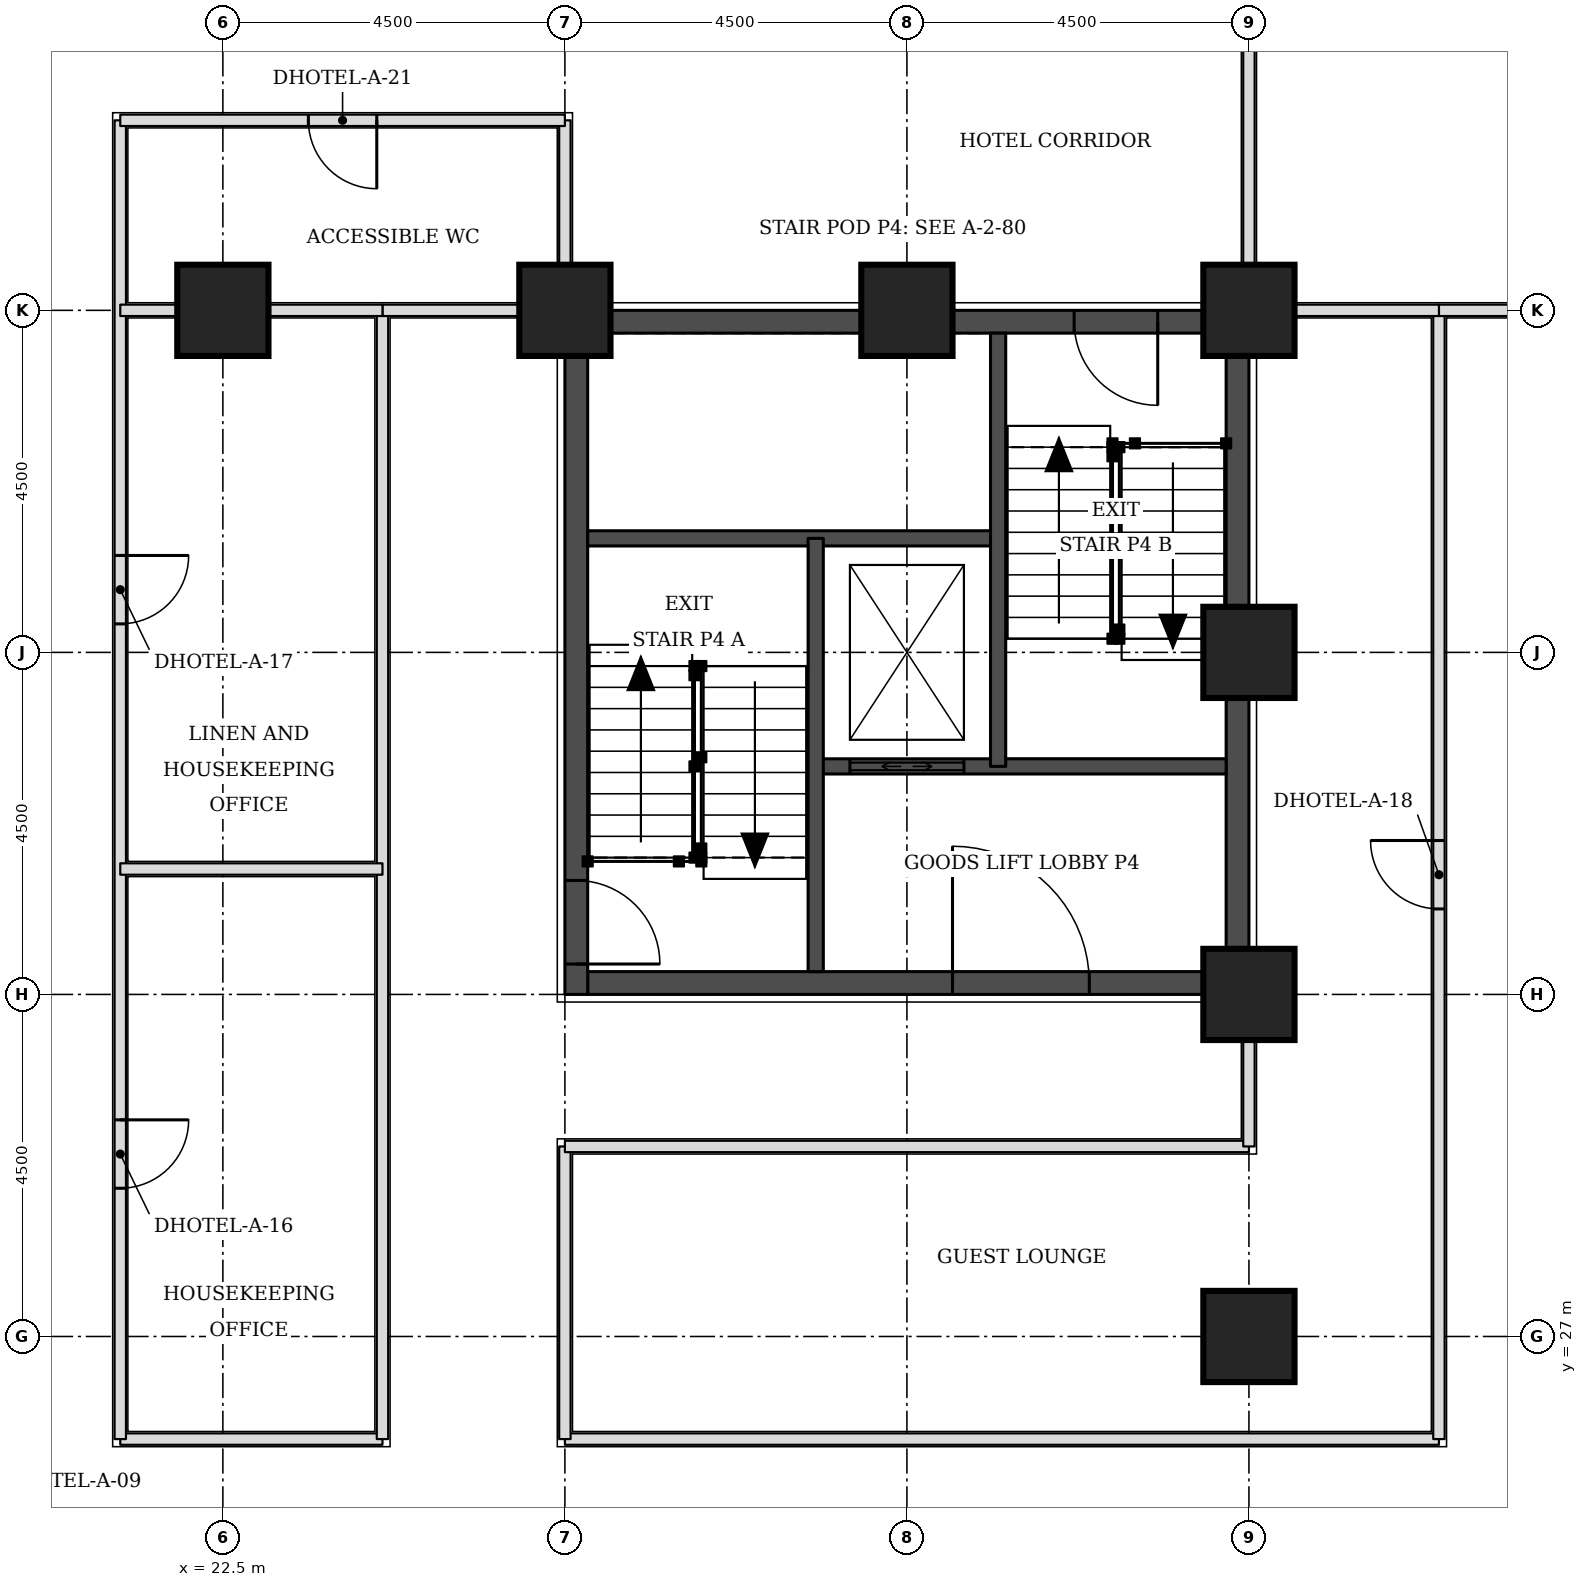
"""IFC4 building model, lengths in metres.
Left out: names, types, materials, properties, quantities, classifications, styles, units other than length and angle.
Written with IfcOpenShell. Run it as: python <this file> out.ifc"""

import sys

from ifc_helpers import new_model, si_unit, direction, frame, frame_2d, origin, origin_2d, place, context, subcontext, project, spatial, rectangle, extrude, element, fill, save


model = new_model("IFC4")
c1 = context("Model", 3, precision=1e-05, world=origin(), true_north=direction((0.0, 1.0)))
c2 = subcontext(c1, "Body", "Model", "MODEL_VIEW")
j1 = project(units=[si_unit("LENGTHUNIT", "METRE"), si_unit("PLANEANGLEUNIT", "RADIAN")], contexts=[c1])
p1 = place(None, origin())
s1 = spatial("IfcSite", under=j1, at=p1, CompositionType="ELEMENT")
p2 = place(p1, origin())
s2 = spatial("IfcBuilding", under=s1, at=p2, CompositionType="ELEMENT")
p3 = place(p2, frame((0.0, 0.0, 49.5)))
s3 = spatial("IfcBuildingStorey", under=s2, at=p3, CompositionType="ELEMENT", Elevation=49.5)
for number, where, z_axis, x_axis in (
    (1, (36.0, 27.0, 0.0), (0.0, 0.0, 1.0), (1.0, 0.0, 0.0)),
    (2, (36.0, 31.5, 0.0), (0.0, 0.0, 1.0), (1.0, 0.0, 0.0)),
    (3, (36.0, 36.0, 0.0), (0.0, 0.0, 1.0), (1.0, 0.0, 0.0)),
    (4, (22.5, 40.5, 0.0), (0.0, 0.0, 1.0), (1.0, 0.0, 0.0)),
    (5, (27.0, 40.5, 0.0), (0.0, 0.0, 1.0), (1.0, 0.0, 0.0)),
    (6, (31.5, 40.5, 0.0), (0.0, 0.0, 1.0), (1.0, 0.0, 0.0)),
    (7, (36.0, 40.5, 0.0), (0.0, 0.0, 1.0), (1.0, 0.0, 0.0)),
):
    element("IfcColumn", number, at=place(p3, frame(where, z_axis=z_axis, x_axis=x_axis)), inside=s3, PredefinedType="COLUMN", context=c2, shape_type="SweptSolid", body=[
        extrude(rectangle(XDim=1.2, YDim=1.2, at=origin_2d()), origin(), (0.0, 0.0, 1.0), 3.3),
    ])
p4 = place(p3, frame((27.3, 31.65, 0.0), z_axis=(0.0, 0.0, 1.0), x_axis=(1.0, 0.0, 0.0)))
e8 = element("IfcWall", 8, at=p4, inside=s3, PredefinedType="SHEAR", context=c2, shape_type="SweptSolid", body=[
    extrude(rectangle(XDim=8.4, YDim=0.3, at=frame_2d((4.2, 0.0))), origin(), (0.0, 0.0, 1.0), 3.3),
])
p5 = place(p4, frame((4.8, 0.0, 0.0)))
e9 = element("IfcOpeningElement", 9, at=p5, cuts=e8, PredefinedType="OPENING", context=c2, shape_type="SweptSolid", body=[
    extrude(rectangle(XDim=1.8, YDim=2.1, at=frame_2d((0.9, 1.05))), frame((0.0, 0.16, 0.0), z_axis=(0.0, -1.0, 0.0), x_axis=(1.0, 0.0, 0.0)), (0.0, 0.0, 1.0), 0.32),
])
p6 = place(p3, frame((27.3, 40.35, 0.0), z_axis=(0.0, 0.0, 1.0), x_axis=(1.0, 0.0, 0.0)))
e10 = element("IfcWall", 10, at=p6, inside=s3, PredefinedType="SHEAR", context=c2, shape_type="SweptSolid", body=[
    extrude(rectangle(XDim=8.4, YDim=0.3, at=frame_2d((4.2, 0.0))), origin(), (0.0, 0.0, 1.0), 3.3),
])
p7 = place(p6, frame((6.4, 0.0, 0.0)))
e11 = element("IfcOpeningElement", 11, at=p7, cuts=e10, PredefinedType="OPENING", context=c2, shape_type="SweptSolid", body=[
    extrude(rectangle(XDim=1.1, YDim=2.1, at=frame_2d((0.55, 1.05))), frame((0.0, 0.16, 0.0), z_axis=(0.0, -1.0, 0.0), x_axis=(1.0, 0.0, 0.0)), (0.0, 0.0, 1.0), 0.32),
])
p8 = place(p3, frame((27.15, 31.5, 0.0), z_axis=(0.0, 0.0, 1.0), x_axis=(0.0, 1.0, 0.0)))
e12 = element("IfcWall", 12, at=p8, inside=s3, PredefinedType="SHEAR", context=c2, shape_type="SweptSolid", body=[
    extrude(rectangle(XDim=9.0, YDim=0.3, at=frame_2d((4.5, 0.0))), origin(), (0.0, 0.0, 1.0), 3.3),
])
p9 = place(p8, frame((0.4, 0.0, 0.0)))
e13 = element("IfcOpeningElement", 13, at=p9, cuts=e12, PredefinedType="OPENING", context=c2, shape_type="SweptSolid", body=[
    extrude(rectangle(XDim=1.1, YDim=2.1, at=frame_2d((0.55, 1.05))), frame((0.0, 0.16, 0.0), z_axis=(0.0, -1.0, 0.0), x_axis=(1.0, 0.0, 0.0)), (0.0, 0.0, 1.0), 0.32),
])
p10 = place(p3, frame((35.85, 31.5, 0.0), z_axis=(0.0, 0.0, 1.0), x_axis=(0.0, 1.0, 0.0)))
e14 = element("IfcWall", 14, at=p10, inside=s3, PredefinedType="SHEAR", context=c2, shape_type="SweptSolid", body=[
    extrude(rectangle(XDim=9.0, YDim=0.3, at=frame_2d((4.5, 0.0))), origin(), (0.0, 0.0, 1.0), 3.3),
])
p11 = place(p3, frame((21.15, 25.65, 0.0), z_axis=(0.0, 0.0, 1.0), x_axis=(1.0, 0.0, 0.0)))
e15 = element("IfcWall", 15, at=p11, inside=s3, PredefinedType="PARTITIONING", context=c2, shape_type="SweptSolid", body=[
    extrude(rectangle(XDim=3.45, YDim=0.15, at=frame_2d((1.725, 0.0))), origin(), (0.0, 0.0, 1.0), 3.08),
])
p12 = place(p3, frame((21.15, 25.65, 0.0), z_axis=(0.0, 0.0, 1.0), x_axis=(0.0, 1.0, 0.0)))
e16 = element("IfcWall", 16, at=p12, inside=s3, PredefinedType="PARTITIONING", context=c2, shape_type="SweptSolid", body=[
    extrude(rectangle(XDim=17.35, YDim=0.15, at=frame_2d((8.675, 0.0))), origin(), (0.0, 0.0, 1.0), 3.08),
])
p13 = place(p12, frame((3.3, 0.0, 0.0)))
e17 = element("IfcOpeningElement", 17, at=p13, cuts=e16, PredefinedType="OPENING", context=c2, shape_type="SweptSolid", body=[
    extrude(rectangle(XDim=0.9, YDim=2.1, at=frame_2d((0.45, 1.05))), frame((0.0, 0.085, 0.0), z_axis=(0.0, -1.0, 0.0), x_axis=(1.0, 0.0, 0.0)), (0.0, 0.0, 1.0), 0.17),
])
p14 = place(p12, frame((10.725, 0.0, 0.0)))
e18 = element("IfcOpeningElement", 18, at=p14, cuts=e16, PredefinedType="OPENING", context=c2, shape_type="SweptSolid", body=[
    extrude(rectangle(XDim=0.9, YDim=2.1, at=frame_2d((0.45, 1.05))), frame((0.0, 0.085, 0.0), z_axis=(0.0, -1.0, 0.0), x_axis=(1.0, 0.0, 0.0)), (0.0, 0.0, 1.0), 0.17),
])
p15 = place(p3, frame((24.6, 25.65, 0.0), z_axis=(0.0, 0.0, 1.0), x_axis=(0.0, 1.0, 0.0)))
e19 = element("IfcWall", 19, at=p15, inside=s3, PredefinedType="PARTITIONING", context=c2, shape_type="SweptSolid", body=[
    extrude(rectangle(XDim=14.85, YDim=0.15, at=frame_2d((7.425, 0.0))), origin(), (0.0, 0.0, 1.0), 3.08),
])
p16 = place(p3, frame((27.0, 25.65, 0.0), z_axis=(0.0, 0.0, 1.0), x_axis=(1.0, 0.0, 0.0)))
e20 = element("IfcWall", 20, at=p16, inside=s3, PredefinedType="PARTITIONING", context=c2, shape_type="SweptSolid", body=[
    extrude(rectangle(XDim=11.5, YDim=0.15, at=frame_2d((5.75, 0.0))), origin(), (0.0, 0.0, 1.0), 3.08),
])
p17 = place(p3, frame((27.0, 25.65, 0.0), z_axis=(0.0, 0.0, 1.0), x_axis=(0.0, 1.0, 0.0)))
e21 = element("IfcWall", 21, at=p17, inside=s3, PredefinedType="PARTITIONING", context=c2, shape_type="SweptSolid", body=[
    extrude(rectangle(XDim=3.85, YDim=0.15, at=frame_2d((1.925, 0.0))), origin(), (0.0, 0.0, 1.0), 3.08),
])
p18 = place(p3, frame((38.5, 25.65, 0.0), z_axis=(0.0, 0.0, 1.0), x_axis=(0.0, 1.0, 0.0)))
e22 = element("IfcWall", 22, at=p18, inside=s3, PredefinedType="PARTITIONING", context=c2, shape_type="SweptSolid", body=[
    extrude(rectangle(XDim=14.85, YDim=0.15, at=frame_2d((7.425, 0.0))), origin(), (0.0, 0.0, 1.0), 3.08),
])
p19 = place(p18, frame((6.975, 0.0, 0.0)))
e23 = element("IfcOpeningElement", 23, at=p19, cuts=e22, PredefinedType="OPENING", context=c2, shape_type="SweptSolid", body=[
    extrude(rectangle(XDim=0.9, YDim=2.1, at=frame_2d((0.45, 1.05))), frame((0.0, 0.085, 0.0), z_axis=(0.0, -1.0, 0.0), x_axis=(1.0, 0.0, 0.0)), (0.0, 0.0, 1.0), 0.17),
])
p20 = place(p3, frame((27.0, 29.5, 0.0), z_axis=(0.0, 0.0, 1.0), x_axis=(1.0, 0.0, 0.0)))
e24 = element("IfcWall", 24, at=p20, inside=s3, PredefinedType="PARTITIONING", context=c2, shape_type="SweptSolid", body=[
    extrude(rectangle(XDim=9.0, YDim=0.15, at=frame_2d((4.5, 0.0))), origin(), (0.0, 0.0, 1.0), 3.08),
])
p21 = place(p3, frame((36.0, 29.5, 0.0), z_axis=(0.0, 0.0, 1.0), x_axis=(0.0, 1.0, 0.0)))
e25 = element("IfcWall", 25, at=p21, inside=s3, PredefinedType="PARTITIONING", context=c2, shape_type="SweptSolid", body=[
    extrude(rectangle(XDim=1.95, YDim=0.15, at=frame_2d((0.975, 0.0))), origin(), (0.0, 0.0, 1.0), 2.33),
])
p22 = place(p3, frame((24.6, 40.5, 0.0), z_axis=(0.0, 0.0, 1.0), x_axis=(1.0, 0.0, 0.0)))
e26 = element("IfcWall", 26, at=p22, inside=s3, PredefinedType="PARTITIONING", context=c2, shape_type="SweptSolid", body=[
    extrude(rectangle(XDim=2.35, YDim=0.15, at=frame_2d((1.175, 0.0))), origin(), (0.0, 0.0, 1.0), 2.33),
])
p23 = place(p3, frame((38.5, 40.5, 0.0), z_axis=(0.0, 0.0, 1.0), x_axis=(1.0, 0.0, 0.0)))
e27 = element("IfcWall", 27, at=p23, inside=s3, PredefinedType="PARTITIONING", context=c2, shape_type="SweptSolid", body=[
    extrude(rectangle(XDim=1.95, YDim=0.15, at=frame_2d((0.975, 0.0))), origin(), (0.0, 0.0, 1.0), 2.33),
])
p24 = place(p3, frame((27.0, 40.55, 0.0), z_axis=(0.0, 0.0, 1.0), x_axis=(0.0, 1.0, 0.0)))
e28 = element("IfcWall", 28, at=p24, inside=s3, PredefinedType="PARTITIONING", context=c2, shape_type="SweptSolid", body=[
    extrude(rectangle(XDim=2.45, YDim=0.15, at=frame_2d((1.225, 0.0))), origin(), (0.0, 0.0, 1.0), 3.08),
])
p25 = place(p3, frame((36.0, 40.55, 0.0), z_axis=(0.0, 0.0, 1.0), x_axis=(0.0, 1.0, 0.0)))
e29 = element("IfcWall", 29, at=p25, inside=s3, PredefinedType="PARTITIONING", context=c2, shape_type="SweptSolid", body=[
    extrude(rectangle(XDim=4.4, YDim=0.15, at=frame_2d((2.2, 0.0))), origin(), (0.0, 0.0, 1.0), 2.33),
])
p26 = place(p3, frame((21.15, 43.0, 0.0), z_axis=(0.0, 0.0, 1.0), x_axis=(1.0, 0.0, 0.0)))
e30 = element("IfcWall", 30, at=p26, inside=s3, PredefinedType="PARTITIONING", context=c2, shape_type="SweptSolid", body=[
    extrude(rectangle(XDim=5.85, YDim=0.15, at=frame_2d((2.925, 0.0))), origin(), (0.0, 0.0, 1.0), 3.08),
])
p27 = place(p26, frame((2.475, 0.0, 0.0)))
e31 = element("IfcOpeningElement", 31, at=p27, cuts=e30, PredefinedType="OPENING", context=c2, shape_type="SweptSolid", body=[
    extrude(rectangle(XDim=0.9, YDim=2.1, at=frame_2d((0.45, 1.05))), frame((0.0, 0.085, 0.0), z_axis=(0.0, -1.0, 0.0), x_axis=(1.0, 0.0, 0.0)), (0.0, 0.0, 1.0), 0.17),
])
p28 = place(p3, frame((21.15, 33.15, 0.0), z_axis=(0.0, 0.0, 1.0), x_axis=(1.0, 0.0, 0.0)))
e32 = element("IfcWall", 32, at=p28, inside=s3, PredefinedType="PARTITIONING", context=c2, shape_type="SweptSolid", body=[
    extrude(rectangle(XDim=3.45, YDim=0.15, at=frame_2d((1.725, 0.0))), origin(), (0.0, 0.0, 1.0), 3.08),
])
p29 = place(p3, frame((21.15, 40.5, 0.0), z_axis=(0.0, 0.0, 1.0), x_axis=(1.0, 0.0, 0.0)))
e33 = element("IfcWall", 33, at=p29, inside=s3, PredefinedType="PARTITIONING", context=c2, shape_type="SweptSolid", body=[
    extrude(rectangle(XDim=3.45, YDim=0.15, at=frame_2d((1.725, 0.0))), origin(), (0.0, 0.0, 1.0), 2.33),
])
p30 = place(p3, frame((36.05, 40.5, 0.0), z_axis=(0.0, 0.0, 1.0), x_axis=(1.0, 0.0, 0.0)))
e34 = element("IfcWall", 34, at=p30, inside=s3, PredefinedType="PARTITIONING", context=c2, shape_type="SweptSolid", body=[
    extrude(rectangle(XDim=2.45, YDim=0.15, at=frame_2d((1.225, 0.0))), origin(), (0.0, 0.0, 1.0), 2.33),
])
p31 = place(p3, frame((30.3, 34.5, 0.0), z_axis=(0.0, 0.0, 1.0), x_axis=(1.0, 0.0, 0.0)))
e35 = element("IfcWall", 35, at=p31, inside=s3, PredefinedType="SOLIDWALL", context=c2, shape_type="SweptSolid", body=[
    extrude(rectangle(XDim=5.4, YDim=0.2, at=frame_2d((2.7, 0.0))), origin(), (0.0, 0.0, 1.0), 3.08),
])
p32 = place(p31, frame((0.45, 0.0, 0.0)))
e36 = element("IfcOpeningElement", 36, at=p32, cuts=e35, PredefinedType="OPENING", context=c2, shape_type="SweptSolid", body=[
    extrude(rectangle(XDim=1.5, YDim=2.1, at=frame_2d((0.75, 1.05))), frame((0.0, 0.11, 0.0), z_axis=(0.0, -1.0, 0.0), x_axis=(1.0, 0.0, 0.0)), (0.0, 0.0, 1.0), 0.22),
])
p33 = place(p3, frame((27.3, 37.5, 0.0), z_axis=(0.0, 0.0, 1.0), x_axis=(1.0, 0.0, 0.0)))
e37 = element("IfcWall", 37, at=p33, inside=s3, PredefinedType="SOLIDWALL", context=c2, shape_type="SweptSolid", body=[
    extrude(rectangle(XDim=5.4, YDim=0.2, at=frame_2d((2.7, 0.0))), origin(), (0.0, 0.0, 1.0), 3.08),
])
for number, where, z_axis, x_axis in (
    (38, (30.3, 31.8, 0.0), (0.0, 0.0, 1.0), (0.0, 1.0, 0.0)),
    (39, (32.7, 34.5, 0.0), (0.0, 0.0, 1.0), (0.0, 1.0, 0.0)),
):
    element("IfcWall", number, at=place(p3, frame(where, z_axis=z_axis, x_axis=x_axis)), inside=s3, PredefinedType="SOLIDWALL", context=c2, shape_type="SweptSolid", body=[
        extrude(rectangle(XDim=5.7, YDim=0.2, at=frame_2d((2.85, 0.0))), origin(), (0.0, 0.0, 1.0), 3.08),
    ])
p34 = place(p19, origin())
e40 = element("IfcDoor", 40, at=p34, inside=s3, OperationType="SINGLE_SWING_RIGHT", PredefinedType="DOOR", context=c2, shape_type="SweptSolid", body=[
    extrude(rectangle(XDim=0.9, YDim=2.1, at=frame_2d((0.45, 1.05))), frame((0.0, 0.025, 0.0), z_axis=(0.0, -1.0, 0.0), x_axis=(1.0, 0.0, 0.0)), (0.0, 0.0, 1.0), 0.05),
])
fill(e23, e40)
p35 = place(p13, frame((0.9, 0.0, 0.0), z_axis=(0.0, 0.0, 1.0), x_axis=(-1.0, 0.0, 0.0)))
e41 = element("IfcDoor", 41, at=p35, inside=s3, OperationType="SINGLE_SWING_LEFT", PredefinedType="DOOR", context=c2, shape_type="SweptSolid", body=[
    extrude(rectangle(XDim=0.9, YDim=2.1, at=frame_2d((0.45, 1.05))), frame((0.0, 0.025, 0.0), z_axis=(0.0, -1.0, 0.0), x_axis=(1.0, 0.0, 0.0)), (0.0, 0.0, 1.0), 0.05),
])
fill(e17, e41)
p36 = place(p14, frame((0.9, 0.0, 0.0), z_axis=(0.0, 0.0, 1.0), x_axis=(-1.0, 0.0, 0.0)))
e42 = element("IfcDoor", 42, at=p36, inside=s3, OperationType="SINGLE_SWING_LEFT", PredefinedType="DOOR", context=c2, shape_type="SweptSolid", body=[
    extrude(rectangle(XDim=0.9, YDim=2.1, at=frame_2d((0.45, 1.05))), frame((0.0, 0.025, 0.0), z_axis=(0.0, -1.0, 0.0), x_axis=(1.0, 0.0, 0.0)), (0.0, 0.0, 1.0), 0.05),
])
fill(e18, e42)
p37 = place(p27, frame((0.9, 0.0, 0.0), z_axis=(0.0, 0.0, 1.0), x_axis=(-1.0, 0.0, 0.0)))
e43 = element("IfcDoor", 43, at=p37, inside=s3, OperationType="SINGLE_SWING_LEFT", PredefinedType="DOOR", context=c2, shape_type="SweptSolid", body=[
    extrude(rectangle(XDim=0.9, YDim=2.1, at=frame_2d((0.45, 1.05))), frame((0.0, 0.025, 0.0), z_axis=(0.0, -1.0, 0.0), x_axis=(1.0, 0.0, 0.0)), (0.0, 0.0, 1.0), 0.05),
])
fill(e31, e43)
p38 = place(p9, frame((1.1, 0.0, 0.0), z_axis=(0.0, 0.0, 1.0), x_axis=(-1.0, 0.0, 0.0)))
e44 = element("IfcDoor", 44, at=p38, inside=s3, OperationType="SINGLE_SWING_RIGHT", PredefinedType="DOOR", context=c2, shape_type="SweptSolid", body=[
    extrude(rectangle(XDim=1.1, YDim=2.1, at=frame_2d((0.55, 1.05))), frame((0.0, 0.025, 0.0), z_axis=(0.0, -1.0, 0.0), x_axis=(1.0, 0.0, 0.0)), (0.0, 0.0, 1.0), 0.05),
])
fill(e13, e44)
p39 = place(p7, frame((1.1, 0.0, 0.0), z_axis=(0.0, 0.0, 1.0), x_axis=(-1.0, 0.0, 0.0)))
e45 = element("IfcDoor", 45, at=p39, inside=s3, OperationType="SINGLE_SWING_LEFT", PredefinedType="DOOR", context=c2, shape_type="SweptSolid", body=[
    extrude(rectangle(XDim=1.1, YDim=2.1, at=frame_2d((0.55, 1.05))), frame((0.0, 0.025, 0.0), z_axis=(0.0, -1.0, 0.0), x_axis=(1.0, 0.0, 0.0)), (0.0, 0.0, 1.0), 0.05),
])
fill(e11, e45)
p40 = place(p32, origin())
e46 = element("IfcDoor", 46, at=p40, inside=s3, OperationType="DOUBLE_DOOR_SLIDING", PredefinedType="DOOR", context=c2, shape_type="SweptSolid", body=[
    extrude(rectangle(XDim=1.5, YDim=2.1, at=frame_2d((0.75, 1.05))), frame((0.0, 0.025, 0.0), z_axis=(0.0, -1.0, 0.0), x_axis=(1.0, 0.0, 0.0)), (0.0, 0.0, 1.0), 0.05),
])
fill(e36, e46)
p41 = place(p5, origin())
e47 = element("IfcDoor", 47, at=p41, inside=s3, OperationType="SINGLE_SWING_LEFT", PredefinedType="DOOR", context=c2, shape_type="SweptSolid", body=[
    extrude(rectangle(XDim=1.8, YDim=2.1, at=frame_2d((0.9, 1.05))), frame((0.0, 0.025, 0.0), z_axis=(0.0, -1.0, 0.0), x_axis=(1.0, 0.0, 0.0)), (0.0, 0.0, 1.0), 0.05),
])
fill(e9, e47)
save(model, sys.argv[1])
